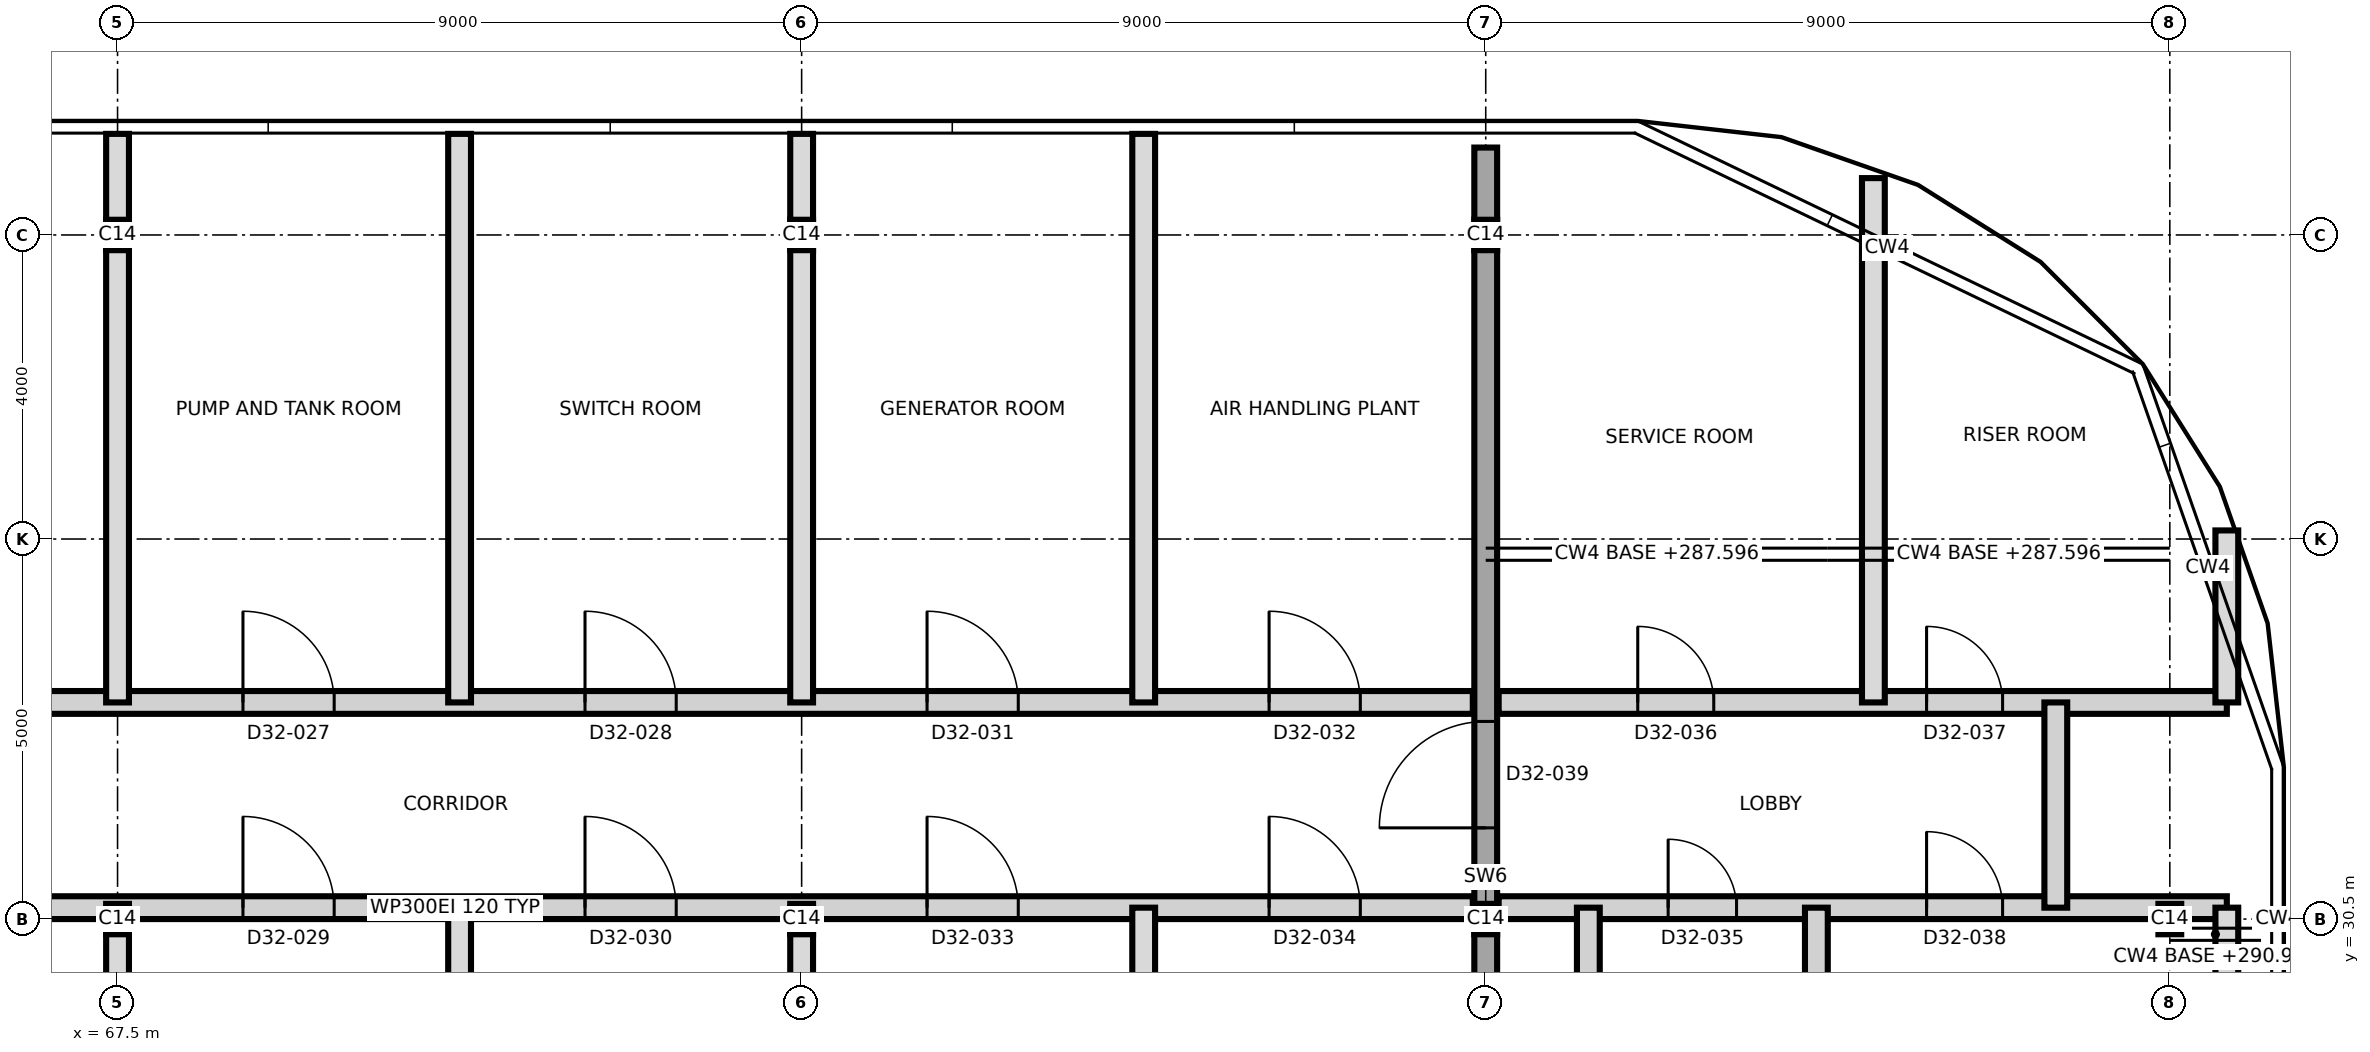
"""IFC4 building model, lengths in metres.
Left out: names, types, materials, properties, quantities, classifications, styles, units other than length and angle.
Written with IfcOpenShell. Run it as: python <this file> out.ifc"""

import sys

from ifc_helpers import new_model, si_unit, direction, frame, frame_2d, origin, origin_2d, place, context, subcontext, project, spatial, rectangle, i_section, extrude, element, fill, save


model = new_model("IFC4")
c1 = context("Model", 3, precision=1e-05, world=origin(), true_north=direction((0.0, 1.0)))
c2 = subcontext(c1, "Body", "Model", "MODEL_VIEW")
j1 = project(units=[si_unit("LENGTHUNIT", "METRE"), si_unit("PLANEANGLEUNIT", "RADIAN")], contexts=[c1])
p1 = place(None, origin())
s1 = spatial("IfcSite", under=j1, at=p1, CompositionType="ELEMENT")
p2 = place(p1, origin())
s2 = spatial("IfcBuilding", under=s1, at=p2, CompositionType="ELEMENT")
p3 = place(p2, frame((0.0, 0.0, 272.9)))
s3 = spatial("IfcBuildingStorey", under=s2, at=p3, CompositionType="ELEMENT", Elevation=272.9)
p4 = place(p3, frame((85.5, 20.35, 0.0), z_axis=(0.0, 0.0, 1.0), x_axis=(0.0, 1.0, 0.0)))
e1 = element("IfcWall", 1, at=p4, inside=s3, PredefinedType="SHEAR", context=c2, shape_type="SweptSolid", body=[
    extrude(rectangle(XDim=20.3, YDim=0.3, at=frame_2d((10.15, 0.0))), origin(), (0.0, 0.0, 1.0), 4.2),
])
p5 = place(p4, frame((11.35, 0.0, 0.0)))
e2 = element("IfcOpeningElement", 2, at=p5, cuts=e1, PredefinedType="OPENING", context=c2, shape_type="SweptSolid", body=[
    extrude(rectangle(XDim=1.4, YDim=2.1, at=frame_2d((0.7, 1.05))), frame((0.0, 0.16, 0.0), z_axis=(0.0, -1.0, 0.0), x_axis=(1.0, 0.0, 0.0)), (0.0, 0.0, 1.0), 0.32),
])
for number, where, z_axis, x_axis in (
    (3, (67.5, 30.5, 0.0), (0.0, 0.0, 1.0), (1.0, 0.0, 0.0)),
    (4, (67.5, 39.5, 0.0), (0.0, 0.0, 1.0), (1.0, 0.0, 0.0)),
    (5, (76.5, 30.5, 0.0), (0.0, 0.0, 1.0), (1.0, 0.0, 0.0)),
    (6, (76.5, 39.5, 0.0), (0.0, 0.0, 1.0), (1.0, 0.0, 0.0)),
    (7, (85.5, 30.5, 0.0), (0.0, 0.0, 1.0), (1.0, 0.0, 0.0)),
    (8, (85.5, 39.5, 0.0), (0.0, 0.0, 1.0), (1.0, 0.0, 0.0)),
    (9, (94.5, 30.5, 0.0), (0.0, 0.0, 1.0), (1.0, 0.0, 0.0)),
):
    element("IfcColumn", number, at=place(p3, frame(where, z_axis=z_axis, x_axis=x_axis)), inside=s3, PredefinedType="COLUMN", context=c2, shape_type="SweptSolid", body=[
        extrude(i_section(OverallWidth=0.3, OverallDepth=0.4, WebThickness=0.013, FlangeThickness=0.024, FilletRadius=0.027, at=origin_2d()), origin(), (0.0, 0.0, 1.0), 4.2),
    ])
p6 = place(p3, frame((58.55, 30.65, 0.0), z_axis=(0.0, 0.0, 1.0), x_axis=(1.0, 0.0, 0.0)))
e10 = element("IfcWall", 10, at=p6, inside=s3, PredefinedType="PARTITIONING", context=c2, shape_type="SweptSolid", body=[
    extrude(rectangle(XDim=26.78, YDim=0.3, at=frame_2d((13.39, 0.0))), origin(), (0.0, 0.0, 1.0), 3.9),
])
p7 = place(p6, frame((1.6, 0.0, 0.0)))
e11 = element("IfcOpeningElement", 11, at=p7, cuts=e10, PredefinedType="OPENING", context=c2, shape_type="SweptSolid", body=[
    extrude(rectangle(XDim=1.2, YDim=2.1, at=frame_2d((0.6, 1.05))), frame((0.0, 0.16, 0.0), z_axis=(0.0, -1.0, 0.0), x_axis=(1.0, 0.0, 0.0)), (0.0, 0.0, 1.0), 0.32),
])
p8 = place(p6, frame((6.1, 0.0, 0.0)))
e12 = element("IfcOpeningElement", 12, at=p8, cuts=e10, PredefinedType="OPENING", context=c2, shape_type="SweptSolid", body=[
    extrude(rectangle(XDim=1.2, YDim=2.1, at=frame_2d((0.6, 1.05))), frame((0.0, 0.16, 0.0), z_axis=(0.0, -1.0, 0.0), x_axis=(1.0, 0.0, 0.0)), (0.0, 0.0, 1.0), 0.32),
])
p9 = place(p6, frame((10.6, 0.0, 0.0)))
e13 = element("IfcOpeningElement", 13, at=p9, cuts=e10, PredefinedType="OPENING", context=c2, shape_type="SweptSolid", body=[
    extrude(rectangle(XDim=1.2, YDim=2.1, at=frame_2d((0.6, 1.05))), frame((0.0, 0.16, 0.0), z_axis=(0.0, -1.0, 0.0), x_axis=(1.0, 0.0, 0.0)), (0.0, 0.0, 1.0), 0.32),
])
p10 = place(p6, frame((15.1, 0.0, 0.0)))
e14 = element("IfcOpeningElement", 14, at=p10, cuts=e10, PredefinedType="OPENING", context=c2, shape_type="SweptSolid", body=[
    extrude(rectangle(XDim=1.2, YDim=2.1, at=frame_2d((0.6, 1.05))), frame((0.0, 0.16, 0.0), z_axis=(0.0, -1.0, 0.0), x_axis=(1.0, 0.0, 0.0)), (0.0, 0.0, 1.0), 0.32),
])
p11 = place(p6, frame((19.6, 0.0, 0.0)))
e15 = element("IfcOpeningElement", 15, at=p11, cuts=e10, PredefinedType="OPENING", context=c2, shape_type="SweptSolid", body=[
    extrude(rectangle(XDim=1.2, YDim=2.1, at=frame_2d((0.6, 1.05))), frame((0.0, 0.16, 0.0), z_axis=(0.0, -1.0, 0.0), x_axis=(1.0, 0.0, 0.0)), (0.0, 0.0, 1.0), 0.32),
])
p12 = place(p6, frame((24.1, 0.0, 0.0)))
e16 = element("IfcOpeningElement", 16, at=p12, cuts=e10, PredefinedType="OPENING", context=c2, shape_type="SweptSolid", body=[
    extrude(rectangle(XDim=1.2, YDim=2.1, at=frame_2d((0.6, 1.05))), frame((0.0, 0.16, 0.0), z_axis=(0.0, -1.0, 0.0), x_axis=(1.0, 0.0, 0.0)), (0.0, 0.0, 1.0), 0.32),
])
p13 = place(p3, frame((85.67, 30.65, 0.0), z_axis=(0.0, 0.0, 1.0), x_axis=(1.0, 0.0, 0.0)))
e17 = element("IfcWall", 17, at=p13, inside=s3, PredefinedType="PARTITIONING", context=c2, shape_type="SweptSolid", body=[
    extrude(rectangle(XDim=9.58, YDim=0.3, at=frame_2d((4.79, 0.0))), origin(), (0.0, 0.0, 1.0), 3.9),
])
p14 = place(p13, frame((2.23, 0.0, 0.0)))
e18 = element("IfcOpeningElement", 18, at=p14, cuts=e17, PredefinedType="OPENING", context=c2, shape_type="SweptSolid", body=[
    extrude(rectangle(XDim=0.9, YDim=2.1, at=frame_2d((0.45, 1.05))), frame((0.0, 0.16, 0.0), z_axis=(0.0, -1.0, 0.0), x_axis=(1.0, 0.0, 0.0)), (0.0, 0.0, 1.0), 0.32),
])
p15 = place(p13, frame((5.63, 0.0, 0.0)))
e19 = element("IfcOpeningElement", 19, at=p15, cuts=e17, PredefinedType="OPENING", context=c2, shape_type="SweptSolid", body=[
    extrude(rectangle(XDim=1.0, YDim=2.1, at=frame_2d((0.5, 1.05))), frame((0.0, 0.16, 0.0), z_axis=(0.0, -1.0, 0.0), x_axis=(1.0, 0.0, 0.0)), (0.0, 0.0, 1.0), 0.32),
])
p16 = place(p3, frame((58.55, 33.35, 0.0), z_axis=(0.0, 0.0, 1.0), x_axis=(1.0, 0.0, 0.0)))
e20 = element("IfcWall", 20, at=p16, inside=s3, PredefinedType="PARTITIONING", context=c2, shape_type="SweptSolid", body=[
    extrude(rectangle(XDim=26.78, YDim=0.3, at=frame_2d((13.39, 0.0))), origin(), (0.0, 0.0, 1.0), 3.9),
])
p17 = place(p16, frame((1.6, 0.0, 0.0)))
e21 = element("IfcOpeningElement", 21, at=p17, cuts=e20, PredefinedType="OPENING", context=c2, shape_type="SweptSolid", body=[
    extrude(rectangle(XDim=1.2, YDim=2.1, at=frame_2d((0.6, 1.05))), frame((0.0, 0.16, 0.0), z_axis=(0.0, -1.0, 0.0), x_axis=(1.0, 0.0, 0.0)), (0.0, 0.0, 1.0), 0.32),
])
p18 = place(p16, frame((6.1, 0.0, 0.0)))
e22 = element("IfcOpeningElement", 22, at=p18, cuts=e20, PredefinedType="OPENING", context=c2, shape_type="SweptSolid", body=[
    extrude(rectangle(XDim=1.2, YDim=2.1, at=frame_2d((0.6, 1.05))), frame((0.0, 0.16, 0.0), z_axis=(0.0, -1.0, 0.0), x_axis=(1.0, 0.0, 0.0)), (0.0, 0.0, 1.0), 0.32),
])
p19 = place(p16, frame((10.6, 0.0, 0.0)))
e23 = element("IfcOpeningElement", 23, at=p19, cuts=e20, PredefinedType="OPENING", context=c2, shape_type="SweptSolid", body=[
    extrude(rectangle(XDim=1.2, YDim=2.1, at=frame_2d((0.6, 1.05))), frame((0.0, 0.16, 0.0), z_axis=(0.0, -1.0, 0.0), x_axis=(1.0, 0.0, 0.0)), (0.0, 0.0, 1.0), 0.32),
])
p20 = place(p16, frame((15.1, 0.0, 0.0)))
e24 = element("IfcOpeningElement", 24, at=p20, cuts=e20, PredefinedType="OPENING", context=c2, shape_type="SweptSolid", body=[
    extrude(rectangle(XDim=1.2, YDim=2.1, at=frame_2d((0.6, 1.05))), frame((0.0, 0.16, 0.0), z_axis=(0.0, -1.0, 0.0), x_axis=(1.0, 0.0, 0.0)), (0.0, 0.0, 1.0), 0.32),
])
p21 = place(p16, frame((19.6, 0.0, 0.0)))
e25 = element("IfcOpeningElement", 25, at=p21, cuts=e20, PredefinedType="OPENING", context=c2, shape_type="SweptSolid", body=[
    extrude(rectangle(XDim=1.2, YDim=2.1, at=frame_2d((0.6, 1.05))), frame((0.0, 0.16, 0.0), z_axis=(0.0, -1.0, 0.0), x_axis=(1.0, 0.0, 0.0)), (0.0, 0.0, 1.0), 0.32),
])
p22 = place(p16, frame((24.1, 0.0, 0.0)))
e26 = element("IfcOpeningElement", 26, at=p22, cuts=e20, PredefinedType="OPENING", context=c2, shape_type="SweptSolid", body=[
    extrude(rectangle(XDim=1.2, YDim=2.1, at=frame_2d((0.6, 1.05))), frame((0.0, 0.16, 0.0), z_axis=(0.0, -1.0, 0.0), x_axis=(1.0, 0.0, 0.0)), (0.0, 0.0, 1.0), 0.32),
])
p23 = place(p3, frame((85.67, 33.35, 0.0), z_axis=(0.0, 0.0, 1.0), x_axis=(1.0, 0.0, 0.0)))
e27 = element("IfcWall", 27, at=p23, inside=s3, PredefinedType="PARTITIONING", context=c2, shape_type="SweptSolid", body=[
    extrude(rectangle(XDim=9.58, YDim=0.3, at=frame_2d((4.79, 0.0))), origin(), (0.0, 0.0, 1.0), 3.9),
])
p24 = place(p23, frame((1.83, 0.0, 0.0)))
e28 = element("IfcOpeningElement", 28, at=p24, cuts=e27, PredefinedType="OPENING", context=c2, shape_type="SweptSolid", body=[
    extrude(rectangle(XDim=1.0, YDim=2.1, at=frame_2d((0.5, 1.05))), frame((0.0, 0.16, 0.0), z_axis=(0.0, -1.0, 0.0), x_axis=(1.0, 0.0, 0.0)), (0.0, 0.0, 1.0), 0.32),
])
p25 = place(p23, frame((5.63, 0.0, 0.0)))
e29 = element("IfcOpeningElement", 29, at=p25, cuts=e27, PredefinedType="OPENING", context=c2, shape_type="SweptSolid", body=[
    extrude(rectangle(XDim=1.0, YDim=2.1, at=frame_2d((0.5, 1.05))), frame((0.0, 0.16, 0.0), z_axis=(0.0, -1.0, 0.0), x_axis=(1.0, 0.0, 0.0)), (0.0, 0.0, 1.0), 0.32),
])
p26 = place(p3, frame((67.5, 20.17, 0.0), z_axis=(0.0, 0.0, 1.0), x_axis=(0.0, 1.0, 0.0)))
e30 = element("IfcWall", 30, at=p26, inside=s3, PredefinedType="PARTITIONING", context=c2, shape_type="SweptSolid", body=[
    extrude(rectangle(XDim=10.48, YDim=0.3, at=frame_2d((5.24, 0.0))), origin(), (0.0, 0.0, 1.0), 3.9),
])
p27 = place(p3, frame((67.5, 33.35, 0.0), z_axis=(0.0, 0.0, 1.0), x_axis=(0.0, 1.0, 0.0)))
e31 = element("IfcWall", 31, at=p27, inside=s3, PredefinedType="PARTITIONING", context=c2, shape_type="SweptSolid", body=[
    extrude(rectangle(XDim=7.48, YDim=0.3, at=frame_2d((3.74, 0.0))), origin(), (0.0, 0.0, 1.0), 3.9),
])
p28 = place(p3, frame((72.0, 20.17, 0.0), z_axis=(0.0, 0.0, 1.0), x_axis=(0.0, 1.0, 0.0)))
e32 = element("IfcWall", 32, at=p28, inside=s3, PredefinedType="PARTITIONING", context=c2, shape_type="SweptSolid", body=[
    extrude(rectangle(XDim=10.48, YDim=0.3, at=frame_2d((5.24, 0.0))), origin(), (0.0, 0.0, 1.0), 3.9),
])
p29 = place(p3, frame((72.0, 33.35, 0.0), z_axis=(0.0, 0.0, 1.0), x_axis=(0.0, 1.0, 0.0)))
e33 = element("IfcWall", 33, at=p29, inside=s3, PredefinedType="PARTITIONING", context=c2, shape_type="SweptSolid", body=[
    extrude(rectangle(XDim=7.48, YDim=0.3, at=frame_2d((3.74, 0.0))), origin(), (0.0, 0.0, 1.0), 3.9),
])
p30 = place(p3, frame((76.5, 20.17, 0.0), z_axis=(0.0, 0.0, 1.0), x_axis=(0.0, 1.0, 0.0)))
e34 = element("IfcWall", 34, at=p30, inside=s3, PredefinedType="PARTITIONING", context=c2, shape_type="SweptSolid", body=[
    extrude(rectangle(XDim=10.48, YDim=0.3, at=frame_2d((5.24, 0.0))), origin(), (0.0, 0.0, 1.0), 3.9),
])
p31 = place(p3, frame((76.5, 33.35, 0.0), z_axis=(0.0, 0.0, 1.0), x_axis=(0.0, 1.0, 0.0)))
e35 = element("IfcWall", 35, at=p31, inside=s3, PredefinedType="PARTITIONING", context=c2, shape_type="SweptSolid", body=[
    extrude(rectangle(XDim=7.48, YDim=0.3, at=frame_2d((3.74, 0.0))), origin(), (0.0, 0.0, 1.0), 3.9),
])
p32 = place(p3, frame((81.0, 20.17, 0.0), z_axis=(0.0, 0.0, 1.0), x_axis=(0.0, 1.0, 0.0)))
e36 = element("IfcWall", 36, at=p32, inside=s3, PredefinedType="PARTITIONING", context=c2, shape_type="SweptSolid", body=[
    extrude(rectangle(XDim=10.48, YDim=0.3, at=frame_2d((5.24, 0.0))), origin(), (0.0, 0.0, 1.0), 3.9),
])
p33 = place(p3, frame((81.0, 33.35, 0.0), z_axis=(0.0, 0.0, 1.0), x_axis=(0.0, 1.0, 0.0)))
e37 = element("IfcWall", 37, at=p33, inside=s3, PredefinedType="PARTITIONING", context=c2, shape_type="SweptSolid", body=[
    extrude(rectangle(XDim=7.48, YDim=0.3, at=frame_2d((3.74, 0.0))), origin(), (0.0, 0.0, 1.0), 3.9),
])
for number, where, z_axis, x_axis in (
    (38, (86.85, 21.8, 0.0), (0.0, 0.0, 1.0), (0.0, 1.0, 0.0)),
    (39, (89.85, 21.8, 0.0), (0.0, 0.0, 1.0), (0.0, 1.0, 0.0)),
):
    element("IfcWall", number, at=place(p3, frame(where, z_axis=z_axis, x_axis=x_axis)), inside=s3, PredefinedType="PARTITIONING", context=c2, shape_type="SweptSolid", body=[
        extrude(rectangle(XDim=8.85, YDim=0.3, at=frame_2d((4.425, 0.0))), origin(), (0.0, 0.0, 1.0), 3.9),
    ])
p34 = place(p3, frame((90.6, 33.35, 0.0), z_axis=(0.0, 0.0, 1.0), x_axis=(0.0, 1.0, 0.0)))
e40 = element("IfcWall", 40, at=p34, inside=s3, PredefinedType="PARTITIONING", context=c2, shape_type="SweptSolid", body=[
    extrude(rectangle(XDim=6.898, YDim=0.3, at=frame_2d((3.449, 0.0))), origin(), (0.0, 0.0, 1.0), 3.9),
])
p35 = place(p3, frame((93.0, 30.65, 0.0), z_axis=(0.0, 0.0, 1.0), x_axis=(0.0, 1.0, 0.0)))
e41 = element("IfcWall", 41, at=p35, inside=s3, PredefinedType="PARTITIONING", context=c2, shape_type="SweptSolid", body=[
    extrude(rectangle(XDim=2.7, YDim=0.3, at=frame_2d((1.35, 0.0))), origin(), (0.0, 0.0, 1.0), 3.9),
])
p36 = place(p3, frame((95.25, 25.387, 0.0), z_axis=(0.0, 0.0, 1.0), x_axis=(0.0, 1.0, 0.0)))
e42 = element("IfcWall", 42, at=p36, inside=s3, PredefinedType="PARTITIONING", context=c2, shape_type="SweptSolid", body=[
    extrude(rectangle(XDim=5.263, YDim=0.3, at=frame_2d((2.631, 0.0))), origin(), (0.0, 0.0, 1.0), 3.9),
])
p37 = place(p3, frame((95.25, 33.35, 0.0), z_axis=(0.0, 0.0, 1.0), x_axis=(0.0, 1.0, 0.0)))
e43 = element("IfcWall", 43, at=p37, inside=s3, PredefinedType="PARTITIONING", context=c2, shape_type="SweptSolid", body=[
    extrude(rectangle(XDim=2.263, YDim=0.3, at=frame_2d((1.131, 0.0))), origin(), (0.0, 0.0, 1.0), 3.9),
])
p38 = place(p19, origin())
e44 = element("IfcDoor", 44, at=p38, inside=s3, OperationType="SINGLE_SWING_LEFT", PredefinedType="DOOR", context=c2, shape_type="SweptSolid", body=[
    extrude(rectangle(XDim=1.2, YDim=2.1, at=frame_2d((0.6, 1.05))), frame((0.0, 0.025, 0.0), z_axis=(0.0, -1.0, 0.0), x_axis=(1.0, 0.0, 0.0)), (0.0, 0.0, 1.0), 0.05),
])
fill(e23, e44)
p39 = place(p20, origin())
e45 = element("IfcDoor", 45, at=p39, inside=s3, OperationType="SINGLE_SWING_RIGHT", PredefinedType="DOOR", context=c2, shape_type="SweptSolid", body=[
    extrude(rectangle(XDim=1.2, YDim=2.1, at=frame_2d((0.6, 1.05))), frame((0.0, 0.025, 0.0), z_axis=(0.0, -1.0, 0.0), x_axis=(1.0, 0.0, 0.0)), (0.0, 0.0, 1.0), 0.05),
])
fill(e24, e45)
p40 = place(p9, origin())
e46 = element("IfcDoor", 46, at=p40, inside=s3, OperationType="SINGLE_SWING_LEFT", PredefinedType="DOOR", context=c2, shape_type="SweptSolid", body=[
    extrude(rectangle(XDim=1.2, YDim=2.1, at=frame_2d((0.6, 1.05))), frame((0.0, 0.025, 0.0), z_axis=(0.0, -1.0, 0.0), x_axis=(1.0, 0.0, 0.0)), (0.0, 0.0, 1.0), 0.05),
])
fill(e13, e46)
p41 = place(p10, origin())
e47 = element("IfcDoor", 47, at=p41, inside=s3, OperationType="SINGLE_SWING_LEFT", PredefinedType="DOOR", context=c2, shape_type="SweptSolid", body=[
    extrude(rectangle(XDim=1.2, YDim=2.1, at=frame_2d((0.6, 1.05))), frame((0.0, 0.025, 0.0), z_axis=(0.0, -1.0, 0.0), x_axis=(1.0, 0.0, 0.0)), (0.0, 0.0, 1.0), 0.05),
])
fill(e14, e47)
p42 = place(p21, origin())
e48 = element("IfcDoor", 48, at=p42, inside=s3, OperationType="SINGLE_SWING_RIGHT", PredefinedType="DOOR", context=c2, shape_type="SweptSolid", body=[
    extrude(rectangle(XDim=1.2, YDim=2.1, at=frame_2d((0.6, 1.05))), frame((0.0, 0.025, 0.0), z_axis=(0.0, -1.0, 0.0), x_axis=(1.0, 0.0, 0.0)), (0.0, 0.0, 1.0), 0.05),
])
fill(e25, e48)
p43 = place(p22, origin())
e49 = element("IfcDoor", 49, at=p43, inside=s3, OperationType="SINGLE_SWING_LEFT", PredefinedType="DOOR", context=c2, shape_type="SweptSolid", body=[
    extrude(rectangle(XDim=1.2, YDim=2.1, at=frame_2d((0.6, 1.05))), frame((0.0, 0.025, 0.0), z_axis=(0.0, -1.0, 0.0), x_axis=(1.0, 0.0, 0.0)), (0.0, 0.0, 1.0), 0.05),
])
fill(e26, e49)
p44 = place(p11, origin())
e50 = element("IfcDoor", 50, at=p44, inside=s3, OperationType="SINGLE_SWING_LEFT", PredefinedType="DOOR", context=c2, shape_type="SweptSolid", body=[
    extrude(rectangle(XDim=1.2, YDim=2.1, at=frame_2d((0.6, 1.05))), frame((0.0, 0.025, 0.0), z_axis=(0.0, -1.0, 0.0), x_axis=(1.0, 0.0, 0.0)), (0.0, 0.0, 1.0), 0.05),
])
fill(e15, e50)
p45 = place(p12, origin())
e51 = element("IfcDoor", 51, at=p45, inside=s3, OperationType="SINGLE_SWING_RIGHT", PredefinedType="DOOR", context=c2, shape_type="SweptSolid", body=[
    extrude(rectangle(XDim=1.2, YDim=2.1, at=frame_2d((0.6, 1.05))), frame((0.0, 0.025, 0.0), z_axis=(0.0, -1.0, 0.0), x_axis=(1.0, 0.0, 0.0)), (0.0, 0.0, 1.0), 0.05),
])
fill(e16, e51)
p46 = place(p14, origin())
e52 = element("IfcDoor", 52, at=p46, inside=s3, OperationType="SINGLE_SWING_LEFT", PredefinedType="DOOR", context=c2, shape_type="SweptSolid", body=[
    extrude(rectangle(XDim=0.9, YDim=2.1, at=frame_2d((0.45, 1.05))), frame((0.0, 0.025, 0.0), z_axis=(0.0, -1.0, 0.0), x_axis=(1.0, 0.0, 0.0)), (0.0, 0.0, 1.0), 0.05),
])
fill(e18, e52)
p47 = place(p24, origin())
e53 = element("IfcDoor", 53, at=p47, inside=s3, OperationType="SINGLE_SWING_LEFT", PredefinedType="DOOR", context=c2, shape_type="SweptSolid", body=[
    extrude(rectangle(XDim=1.0, YDim=2.1, at=frame_2d((0.5, 1.05))), frame((0.0, 0.025, 0.0), z_axis=(0.0, -1.0, 0.0), x_axis=(1.0, 0.0, 0.0)), (0.0, 0.0, 1.0), 0.05),
])
fill(e28, e53)
p48 = place(p25, origin())
e54 = element("IfcDoor", 54, at=p48, inside=s3, OperationType="SINGLE_SWING_RIGHT", PredefinedType="DOOR", context=c2, shape_type="SweptSolid", body=[
    extrude(rectangle(XDim=1.0, YDim=2.1, at=frame_2d((0.5, 1.05))), frame((0.0, 0.025, 0.0), z_axis=(0.0, -1.0, 0.0), x_axis=(1.0, 0.0, 0.0)), (0.0, 0.0, 1.0), 0.05),
])
fill(e29, e54)
p49 = place(p15, origin())
e55 = element("IfcDoor", 55, at=p49, inside=s3, OperationType="SINGLE_SWING_LEFT", PredefinedType="DOOR", context=c2, shape_type="SweptSolid", body=[
    extrude(rectangle(XDim=1.0, YDim=2.1, at=frame_2d((0.5, 1.05))), frame((0.0, 0.025, 0.0), z_axis=(0.0, -1.0, 0.0), x_axis=(1.0, 0.0, 0.0)), (0.0, 0.0, 1.0), 0.05),
])
fill(e19, e55)
p50 = place(p5, origin())
e56 = element("IfcDoor", 56, at=p50, inside=s3, OperationType="SINGLE_SWING_RIGHT", PredefinedType="DOOR", context=c2, shape_type="SweptSolid", body=[
    extrude(rectangle(XDim=1.4, YDim=2.1, at=frame_2d((0.7, 1.05))), frame((0.0, 0.025, 0.0), z_axis=(0.0, -1.0, 0.0), x_axis=(1.0, 0.0, 0.0)), (0.0, 0.0, 1.0), 0.05),
])
fill(e2, e56)
save(model, sys.argv[1])
